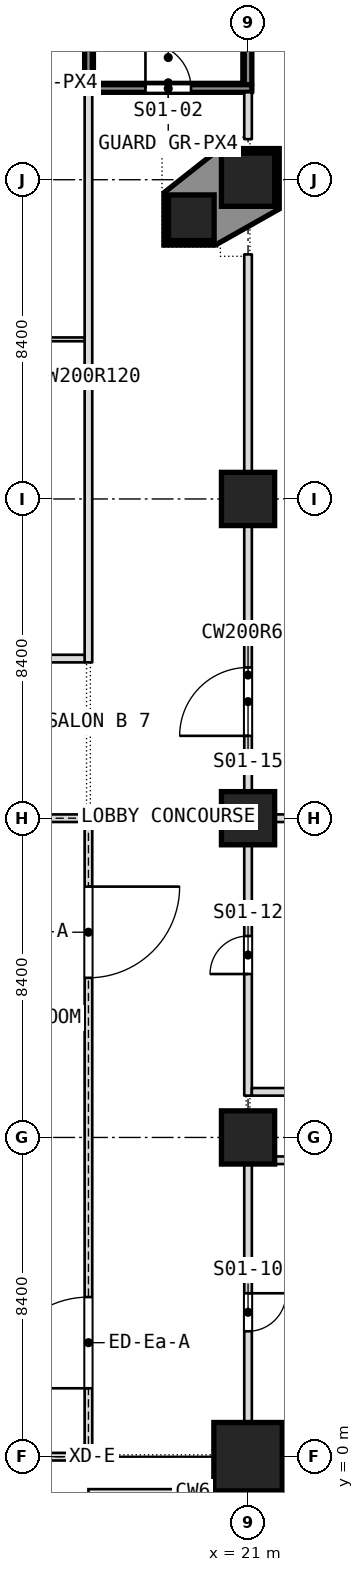
"""IFC4 building model, lengths in metres.
Left out: names, types, materials, properties, quantities, classifications, styles, units other than length and angle.
Written with IfcOpenShell. Run it as: python <this file> out.ifc"""

import sys

from ifc_helpers import new_model, si_unit, direction, frame, frame_2d, origin, origin_2d, place, context, subcontext, project, spatial, polyline, rectangle, outline, extrude, element, fill, save


model = new_model("IFC4")
c1 = context("Model", 3, precision=1e-05, world=origin(), true_north=direction((0.0, 1.0)))
c2 = subcontext(c1, "Body", "Model", "MODEL_VIEW")
j1 = project(units=[si_unit("LENGTHUNIT", "METRE"), si_unit("PLANEANGLEUNIT", "RADIAN")], contexts=[c1])
p1 = place(None, origin())
s1 = spatial("IfcSite", under=j1, at=p1, CompositionType="ELEMENT")
p2 = place(p1, origin())
s2 = spatial("IfcBuilding", under=s1, at=p2, CompositionType="ELEMENT")
p3 = place(p2, origin())
s3 = spatial("IfcBuildingStorey", under=s2, at=p3, CompositionType="ELEMENT", Elevation=0.0)
p4 = place(p3, frame((21.0, 0.0, -0.3), z_axis=(0.0, 0.0, 1.0), x_axis=(1.0, 0.0, 0.0)))
e1 = element("IfcColumn", 1, at=p4, inside=s3, PredefinedType="COLUMN", context=c2, shape_type="SweptSolid", body=[
    extrude(rectangle(XDim=1.8, YDim=1.8, at=origin_2d()), origin(), (0.0, 0.0, 1.0), 8.3),
])
for number, where, z_axis, x_axis in (
    (2, (21.0, 8.4, -0.3), (0.0, 0.0, 1.0), (1.0, 0.0, 0.0)),
    (3, (21.0, 16.8, -0.3), (0.0, 0.0, 1.0), (1.0, 0.0, 0.0)),
    (4, (21.0, 25.2, -0.3), (0.0, 0.0, 1.0), (1.0, 0.0, 0.0)),
    (5, (21.0, 33.6, -0.3), (0.0, 0.0, 1.0), (1.0, 0.0, 0.0)),
):
    element("IfcColumn", number, at=place(p3, frame(where, z_axis=z_axis, x_axis=x_axis)), inside=s3, PredefinedType="COLUMN", context=c2, shape_type="SweptSolid", body=[
        extrude(rectangle(XDim=1.4, YDim=1.4, at=origin_2d()), origin(), (0.0, 0.0, 1.0), 8.3),
    ])
p5 = place(p3, frame((19.507, 32.6, -0.3), z_axis=(0.0, 0.0, 1.0), x_axis=(1.0, 0.0, 0.0)))
e6 = element("IfcColumn", 6, at=p5, inside=s3, PredefinedType="COLUMN", context=c2, shape_type="SweptSolid", body=[
    extrude(rectangle(XDim=1.2, YDim=1.2, at=origin_2d()), origin(), (0.0, 0.0, 1.0), 8.3),
])
p6 = place(p3, frame((21.0, -0.894, 0.0), z_axis=(0.0, 0.0, 1.0), x_axis=(0.0, 1.0, 0.0)))
e7 = element("IfcWall", 7, at=p6, inside=s3, PredefinedType="PARTITIONING", context=c2, shape_type="SweptSolid", body=[
    extrude(rectangle(XDim=8.794, YDim=0.2, at=frame_2d((4.397, 0.0))), origin(), (0.0, 0.0, 1.0), 7.68),
])
p7 = place(p6, frame((4.194, 0.0, 0.0)))
e8 = element("IfcOpeningElement", 8, at=p7, cuts=e7, PredefinedType="OPENING", context=c2, shape_type="SweptSolid", body=[
    extrude(rectangle(XDim=1.0, YDim=2.1, at=frame_2d((0.5, 1.05))), frame((0.0, 0.1, 0.0), z_axis=(0.0, -1.0, 0.0), x_axis=(1.0, 0.0, 0.0)), (0.0, 0.0, 1.0), 0.2),
])
p8 = place(p3, frame((21.0, 9.5, 0.0), z_axis=(0.0, 0.0, 1.0), x_axis=(0.0, 1.0, 0.0)))
e9 = element("IfcWall", 9, at=p8, inside=s3, PredefinedType="PARTITIONING", context=c2, shape_type="SweptSolid", body=[
    extrude(rectangle(XDim=22.135, YDim=0.2, at=frame_2d((11.067, 0.0))), origin(), (0.0, 0.0, 1.0), 7.68),
])
p9 = place(p8, frame((3.2, 0.0, 0.0)))
e10 = element("IfcOpeningElement", 10, at=p9, cuts=e9, PredefinedType="OPENING", context=c2, shape_type="SweptSolid", body=[
    extrude(rectangle(XDim=1.0, YDim=2.1, at=frame_2d((0.5, 1.05))), frame((0.0, 0.1, 0.0), z_axis=(0.0, -1.0, 0.0), x_axis=(1.0, 0.0, 0.0)), (0.0, 0.0, 1.0), 0.2),
])
p10 = place(p8, frame((9.467, 0.0, 0.0)))
e11 = element("IfcOpeningElement", 11, at=p10, cuts=e9, PredefinedType="OPENING", context=c2, shape_type="SweptSolid", body=[
    extrude(rectangle(XDim=1.8, YDim=2.1, at=frame_2d((0.9, 1.05))), frame((0.0, 0.1, 0.0), z_axis=(0.0, -1.0, 0.0), x_axis=(1.0, 0.0, 0.0)), (0.0, 0.0, 1.0), 0.2),
])
p11 = place(p3, frame((21.0, 34.668, 0.0), z_axis=(0.0, 0.0, 1.0), x_axis=(0.0, 1.0, 0.0)))
e12 = element("IfcWall", 12, at=p11, inside=s3, PredefinedType="PARTITIONING", context=c2, shape_type="SweptSolid", body=[
    extrude(rectangle(XDim=1.232, YDim=0.2, at=frame_2d((0.616, 0.0))), origin(), (0.0, 0.0, 1.0), 7.68),
])
p12 = place(p3, frame((21.0, 36.1, 0.0), z_axis=(0.0, 0.0, 1.0), x_axis=(0.0, 1.0, 0.0)))
e13 = element("IfcWall", 13, at=p12, inside=s3, PredefinedType="PARTITIONING", context=c2, shape_type="SweptSolid", body=[
    extrude(rectangle(XDim=6.2, YDim=0.2, at=frame_2d((3.1, 0.0))), origin(), (0.0, 0.0, 1.0), 7.68),
])
p13 = place(p3, frame((16.8, 20.9, 0.0), z_axis=(0.0, 0.0, 1.0), x_axis=(0.0, 1.0, 0.0)))
e14 = element("IfcWall", 14, at=p13, inside=s3, PredefinedType="PARTITIONING", context=c2, shape_type="SweptSolid", body=[
    extrude(rectangle(XDim=15.0, YDim=0.2, at=frame_2d((7.5, 0.0))), origin(), (0.0, 0.0, 1.0), 7.68),
])
p14 = place(p3, frame((16.8, 36.1, 0.0), z_axis=(0.0, 0.0, 1.0), x_axis=(0.0, 1.0, 0.0)))
e15 = element("IfcWall", 15, at=p14, inside=s3, PredefinedType="PARTITIONING", context=c2, shape_type="SweptSolid", body=[
    extrude(rectangle(XDim=5.9, YDim=0.2, at=frame_2d((2.95, 0.0))), origin(), (0.0, 0.0, 1.0), 7.68),
])
p15 = place(p3, frame((21.1, 7.8, 0.0), z_axis=(0.0, 0.0, 1.0), x_axis=(1.0, 0.0, 0.0)))
e16 = element("IfcWall", 16, at=p15, inside=s3, PredefinedType="PARTITIONING", context=c2, shape_type="SweptSolid", body=[
    extrude(rectangle(XDim=17.0, YDim=0.2, at=frame_2d((8.5, 0.0))), origin(), (0.0, 0.0, 1.0), 7.68),
])
p16 = place(p3, frame((21.1, 9.6, 0.0), z_axis=(0.0, 0.0, 1.0), x_axis=(1.0, 0.0, 0.0)))
e17 = element("IfcWall", 17, at=p16, inside=s3, PredefinedType="PARTITIONING", context=c2, shape_type="SweptSolid", body=[
    extrude(rectangle(XDim=16.7, YDim=0.2, at=frame_2d((8.35, 0.0))), origin(), (0.0, 0.0, 1.0), 7.68),
])
p17 = place(p16, frame((14.0, 0.0, 0.0)))
e18 = element("IfcOpeningElement", 18, at=p17, cuts=e17, PredefinedType="OPENING", context=c2, shape_type="SweptSolid", body=[
    extrude(rectangle(XDim=1.2, YDim=2.1, at=frame_2d((0.6, 1.05))), frame((0.0, 0.1, 0.0), z_axis=(0.0, -1.0, 0.0), x_axis=(1.0, 0.0, 0.0)), (0.0, 0.0, 1.0), 0.2),
])
p18 = place(p3, frame((21.1, 16.8, 0.0), z_axis=(0.0, 0.0, 1.0), x_axis=(1.0, 0.0, 0.0)))
e19 = element("IfcWall", 19, at=p18, inside=s3, PredefinedType="PARTITIONING", context=c2, shape_type="SweptSolid", body=[
    extrude(rectangle(XDim=6.53, YDim=0.2, at=frame_2d((3.265, 0.0))), origin(), (0.0, 0.0, 1.0), 7.68),
])
p19 = place(p3, frame((-16.7, 21.0, 0.0), z_axis=(0.0, 0.0, 1.0), x_axis=(1.0, 0.0, 0.0)))
e20 = element("IfcWall", 20, at=p19, inside=s3, PredefinedType="PARTITIONING", context=c2, shape_type="SweptSolid", body=[
    extrude(rectangle(XDim=33.4, YDim=0.2, at=frame_2d((16.7, 0.0))), origin(), (0.0, 0.0, 1.0), 7.68),
])
p20 = place(p19, frame((15.825, 0.0, 0.0)))
e21 = element("IfcOpeningElement", 21, at=p20, cuts=e20, PredefinedType="OPENING", context=c2, shape_type="SweptSolid", body=[
    extrude(rectangle(XDim=1.8, YDim=2.1, at=frame_2d((0.9, 1.05))), frame((0.0, 0.1, 0.0), z_axis=(0.0, -1.0, 0.0), x_axis=(1.0, 0.0, 0.0)), (0.0, 0.0, 1.0), 0.2),
])
p21 = place(p19, frame((7.375, 0.0, 0.0)))
e22 = element("IfcOpeningElement", 22, at=p21, cuts=e20, PredefinedType="OPENING", context=c2, shape_type="SweptSolid", body=[
    extrude(rectangle(XDim=1.8, YDim=2.1, at=frame_2d((0.9, 1.05))), frame((0.0, 0.1, 0.0), z_axis=(0.0, -1.0, 0.0), x_axis=(1.0, 0.0, 0.0)), (0.0, 0.0, 1.0), 0.2),
])
p22 = place(p19, frame((24.175, 0.0, 0.0)))
e23 = element("IfcOpeningElement", 23, at=p22, cuts=e20, PredefinedType="OPENING", context=c2, shape_type="SweptSolid", body=[
    extrude(rectangle(XDim=1.8, YDim=2.1, at=frame_2d((0.9, 1.05))), frame((0.0, 0.1, 0.0), z_axis=(0.0, -1.0, 0.0), x_axis=(1.0, 0.0, 0.0)), (0.0, 0.0, 1.0), 0.2),
])
p23 = place(p19, frame((30.425, 0.0, 0.0)))
e24 = element("IfcOpeningElement", 24, at=p23, cuts=e20, PredefinedType="OPENING", context=c2, shape_type="SweptSolid", body=[
    extrude(rectangle(XDim=1.8, YDim=2.1, at=frame_2d((0.9, 1.05))), frame((0.0, 0.1, 0.0), z_axis=(0.0, -1.0, 0.0), x_axis=(1.0, 0.0, 0.0)), (0.0, 0.0, 1.0), 0.2),
])
p24 = place(p3, frame((4.1, 29.4, 0.0), z_axis=(0.0, 0.0, 1.0), x_axis=(1.0, 0.0, 0.0)))
e25 = element("IfcWall", 25, at=p24, inside=s3, PredefinedType="PARTITIONING", context=c2, shape_type="SweptSolid", body=[
    extrude(rectangle(XDim=12.6, YDim=0.1, at=frame_2d((6.3, 0.0))), origin(), (0.0, 0.0, 1.0), 7.68),
])
p25 = place(p24, frame((3.575, 0.0, 0.0)))
e26 = element("IfcOpeningElement", 26, at=p25, cuts=e25, PredefinedType="OPENING", context=c2, shape_type="SweptSolid", body=[
    extrude(rectangle(XDim=1.0, YDim=2.1, at=frame_2d((0.5, 1.05))), frame((0.0, 0.05, 0.0), z_axis=(0.0, -1.0, 0.0), x_axis=(1.0, 0.0, 0.0)), (0.0, 0.0, 1.0), 0.1),
])
p26 = place(p3, frame((16.7, 36.0, 0.0), z_axis=(0.0, 0.0, 1.0), x_axis=(1.0, 0.0, 0.0)))
e27 = element("IfcWall", 27, at=p26, inside=s3, PredefinedType="PARTITIONING", context=c2, shape_type="SweptSolid", body=[
    extrude(rectangle(XDim=4.4, YDim=0.2, at=frame_2d((2.2, 0.0))), origin(), (0.0, 0.0, 1.0), 7.68),
])
p27 = place(p26, frame((1.6, 0.0, 0.0)))
e28 = element("IfcOpeningElement", 28, at=p27, cuts=e27, PredefinedType="OPENING", context=c2, shape_type="SweptSolid", body=[
    extrude(rectangle(XDim=1.2, YDim=2.1, at=frame_2d((0.6, 1.05))), frame((0.0, 0.1, 0.0), z_axis=(0.0, -1.0, 0.0), x_axis=(1.0, 0.0, 0.0)), (0.0, 0.0, 1.0), 0.2),
])
p28 = place(p3, frame((16.8, -0.1, 0.0), z_axis=(0.0, 0.0, 1.0), x_axis=(0.0, 1.0, 0.0)))
e29 = element("IfcWall", 29, at=p28, inside=s3, PredefinedType="PARTITIONING", context=c2, shape_type="SweptSolid", body=[
    extrude(rectangle(XDim=17.0, YDim=0.2, at=frame_2d((8.5, 0.0))), origin(), (0.0, 0.0, 1.0), 7.78),
])
p29 = place(p28, frame((1.9, 0.0, 0.0)))
e30 = element("IfcOpeningElement", 30, at=p29, cuts=e29, PredefinedType="OPENING", context=c2, shape_type="SweptSolid", body=[
    extrude(rectangle(XDim=2.4, YDim=2.1, at=frame_2d((1.2, 1.05))), frame((0.0, 0.1, 0.0), z_axis=(0.0, -1.0, 0.0), x_axis=(1.0, 0.0, 0.0)), (0.0, 0.0, 1.0), 0.2),
])
p30 = place(p28, frame((12.7, 0.0, 0.0)))
e31 = element("IfcOpeningElement", 31, at=p30, cuts=e29, PredefinedType="OPENING", context=c2, shape_type="SweptSolid", body=[
    extrude(rectangle(XDim=2.4, YDim=2.1, at=frame_2d((1.2, 1.05))), frame((0.0, 0.1, 0.0), z_axis=(0.0, -1.0, 0.0), x_axis=(1.0, 0.0, 0.0)), (0.0, 0.0, 1.0), 0.2),
])
p31 = place(p3, frame((12.6, 0.0, 0.0), z_axis=(0.0, 0.0, 1.0), x_axis=(1.0, 0.0, 0.0)))
e32 = element("IfcWall", 32, at=p31, inside=s3, PredefinedType="PARTITIONING", context=c2, shape_type="SweptSolid", body=[
    extrude(rectangle(XDim=4.1, YDim=0.2, at=frame_2d((2.05, 0.0))), origin(), (0.0, 0.0, 1.0), 7.78),
])
p32 = place(p31, frame((1.2, 0.0, 0.0)))
e33 = element("IfcOpeningElement", 33, at=p32, cuts=e32, PredefinedType="OPENING", context=c2, shape_type="SweptSolid", body=[
    extrude(rectangle(XDim=1.8, YDim=2.1, at=frame_2d((0.9, 1.05))), frame((0.0, 0.1, 0.0), z_axis=(0.0, -1.0, 0.0), x_axis=(1.0, 0.0, 0.0)), (0.0, 0.0, 1.0), 0.2),
])
p33 = place(p3, frame((12.6, 16.8, 0.0), z_axis=(0.0, 0.0, 1.0), x_axis=(1.0, 0.0, 0.0)))
e34 = element("IfcWall", 34, at=p33, inside=s3, PredefinedType="PARTITIONING", context=c2, shape_type="SweptSolid", body=[
    extrude(rectangle(XDim=4.1, YDim=0.2, at=frame_2d((2.05, 0.0))), origin(), (0.0, 0.0, 1.0), 7.78),
])
p34 = place(p3, origin())
e35 = element("IfcWall", 35, at=p34, inside=s3, PredefinedType="SOLIDWALL", context=c2, shape_type="SweptSolid", body=[
    extrude(outline(polyline([(20.258, 34.42), (21.82, 34.42), (21.82, 32.83), (20.138, 31.88), (18.787, 31.88), (18.787, 33.258), (20.258, 34.42)]), holes=[polyline([(21.7, 32.9), (21.7, 34.3), (20.3, 34.3), (20.3, 32.9), (21.7, 32.9)]), polyline([(20.107, 32.0), (20.107, 33.2), (18.907, 33.2), (18.907, 32.0), (20.107, 32.0)])]), origin(), (0.0, 0.0, 1.0), 8.0),
])
p35 = place(p7, origin())
e36 = element("IfcDoor", 36, at=p35, inside=s3, OperationType="SINGLE_SWING_LEFT", PredefinedType="DOOR", context=c2, shape_type="SweptSolid", body=[
    extrude(rectangle(XDim=1.0, YDim=2.1, at=frame_2d((0.5, 1.05))), frame((0.0, 0.025, 0.0), z_axis=(0.0, -1.0, 0.0), x_axis=(1.0, 0.0, 0.0)), (0.0, 0.0, 1.0), 0.05),
])
fill(e8, e36)
p36 = place(p9, origin())
e37 = element("IfcDoor", 37, at=p36, inside=s3, OperationType="SINGLE_SWING_LEFT", PredefinedType="DOOR", context=c2, shape_type="SweptSolid", body=[
    extrude(rectangle(XDim=1.0, YDim=2.1, at=frame_2d((0.5, 1.05))), frame((0.0, 0.025, 0.0), z_axis=(0.0, -1.0, 0.0), x_axis=(1.0, 0.0, 0.0)), (0.0, 0.0, 1.0), 0.05),
])
fill(e10, e37)
p37 = place(p10, origin())
e38 = element("IfcDoor", 38, at=p37, inside=s3, OperationType="DOUBLE_DOOR_SINGLE_SWING", PredefinedType="DOOR", context=c2, shape_type="SweptSolid", body=[
    extrude(rectangle(XDim=1.8, YDim=2.1, at=frame_2d((0.9, 1.05))), frame((0.0, 0.025, 0.0), z_axis=(0.0, -1.0, 0.0), x_axis=(1.0, 0.0, 0.0)), (0.0, 0.0, 1.0), 0.05),
])
fill(e11, e38)
p38 = place(p27, origin())
e39 = element("IfcDoor", 39, at=p38, inside=s3, OperationType="SINGLE_SWING_LEFT", PredefinedType="DOOR", context=c2, shape_type="SweptSolid", body=[
    extrude(rectangle(XDim=1.2, YDim=2.1, at=frame_2d((0.6, 1.05))), frame((0.0, 0.025, 0.0), z_axis=(0.0, -1.0, 0.0), x_axis=(1.0, 0.0, 0.0)), (0.0, 0.0, 1.0), 0.05),
])
fill(e28, e39)
p39 = place(p29, origin())
e40 = element("IfcDoor", 40, at=p39, inside=s3, OperationType="DOUBLE_DOOR_SINGLE_SWING", PredefinedType="DOOR", context=c2, shape_type="SweptSolid", body=[
    extrude(rectangle(XDim=2.4, YDim=2.1, at=frame_2d((1.2, 1.05))), frame((0.0, 0.025, 0.0), z_axis=(0.0, -1.0, 0.0), x_axis=(1.0, 0.0, 0.0)), (0.0, 0.0, 1.0), 0.05),
])
fill(e30, e40)
p40 = place(p30, origin())
e41 = element("IfcDoor", 41, at=p40, inside=s3, OperationType="DOUBLE_DOOR_SINGLE_SWING", PredefinedType="DOOR", context=c2, shape_type="SweptSolid", body=[
    extrude(rectangle(XDim=2.4, YDim=2.1, at=frame_2d((1.2, 1.05))), frame((0.0, 0.025, 0.0), z_axis=(0.0, -1.0, 0.0), x_axis=(1.0, 0.0, 0.0)), (0.0, 0.0, 1.0), 0.05),
])
fill(e31, e41)
save(model, sys.argv[1])
